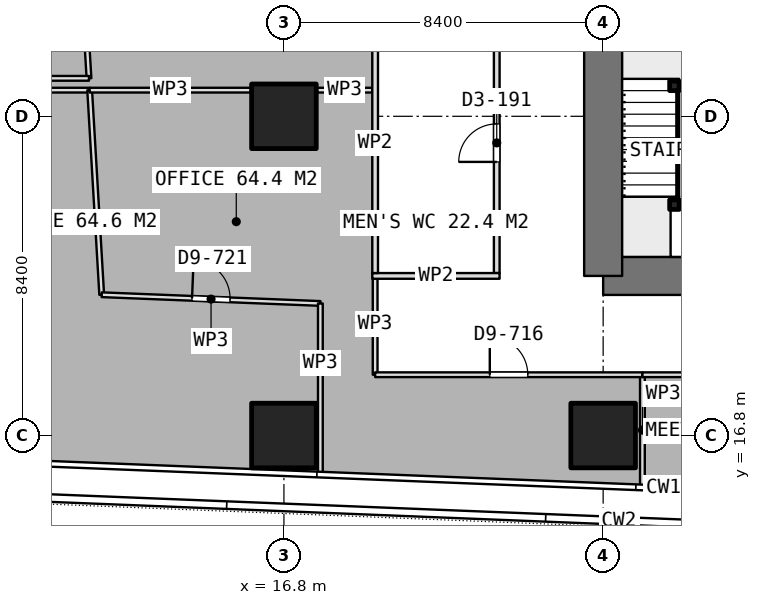
"""IFC4 building model, lengths in metres.
Left out: names, types, materials, properties, quantities, classifications, styles, units other than length and angle.
Written with IfcOpenShell. Run it as: python <this file> out.ifc"""

import sys

from ifc_helpers import new_model, si_unit, direction, frame, frame_2d, origin, origin_2d, place, context, subcontext, project, spatial, rectangle, extrude, element, fill, save


model = new_model("IFC4")
c1 = context("Model", 3, precision=1e-05, world=origin(), true_north=direction((0.0, 1.0)))
c2 = subcontext(c1, "Body", "Model", "MODEL_VIEW")
j1 = project(units=[si_unit("LENGTHUNIT", "METRE"), si_unit("PLANEANGLEUNIT", "RADIAN")], contexts=[c1])
p1 = place(None, origin())
s1 = spatial("IfcSite", under=j1, at=p1, CompositionType="ELEMENT")
p2 = place(p1, origin())
s2 = spatial("IfcBuilding", under=s1, at=p2, CompositionType="ELEMENT")
p3 = place(p2, frame((0.0, 0.0, 183.95)))
s3 = spatial("IfcBuildingStorey", under=s2, at=p3, CompositionType="ELEMENT", Elevation=183.95)
p4 = place(p3, frame((25.2, 21.0, 0.0), z_axis=(0.0, 0.0, 1.0), x_axis=(1.0, 0.0, 0.0)))
e1 = element("IfcWall", 1, at=p4, inside=s3, PredefinedType="SHEAR", context=c2, shape_type="SweptSolid", body=[
    extrude(rectangle(XDim=10.4, YDim=1.0, at=frame_2d((5.2, 0.0))), origin(), (0.0, 0.0, 1.0), 3.75),
])
p5 = place(p3, frame((25.2, 21.0, 0.0), z_axis=(0.0, 0.0, 1.0), x_axis=(0.0, 1.0, 0.0)))
e2 = element("IfcWall", 2, at=p5, inside=s3, PredefinedType="SHEAR", context=c2, shape_type="SweptSolid", body=[
    extrude(rectangle(XDim=25.2, YDim=1.0, at=frame_2d((12.6, 0.0))), origin(), (0.0, 0.0, 1.0), 3.75),
])
p6 = place(p5, frame((7.8, 0.0, 0.0)))
e3 = element("IfcOpeningElement", 3, at=p6, cuts=e2, PredefinedType="OPENING", context=c2, shape_type="SweptSolid", body=[
    extrude(rectangle(XDim=1.2, YDim=2.1, at=frame_2d((0.6, 1.05))), frame((0.0, 0.51, 0.0), z_axis=(0.0, -1.0, 0.0), x_axis=(1.0, 0.0, 0.0)), (0.0, 0.0, 1.0), 1.02),
])
p7 = place(p5, frame((14.25, 0.0, 0.0)))
e4 = element("IfcOpeningElement", 4, at=p7, cuts=e2, PredefinedType="OPENING", context=c2, shape_type="SweptSolid", body=[
    extrude(rectangle(XDim=0.9, YDim=2.1, at=frame_2d((0.45, 1.05))), frame((0.0, 0.51, 0.0), z_axis=(0.0, -1.0, 0.0), x_axis=(1.0, 0.0, 0.0)), (0.0, 0.0, 1.0), 1.02),
])
p8 = place(p5, frame((16.85, 0.0, 0.0)))
e5 = element("IfcOpeningElement", 5, at=p8, cuts=e2, PredefinedType="OPENING", context=c2, shape_type="SweptSolid", body=[
    extrude(rectangle(XDim=0.9, YDim=2.1, at=frame_2d((0.45, 1.05))), frame((0.0, 0.51, 0.0), z_axis=(0.0, -1.0, 0.0), x_axis=(1.0, 0.0, 0.0)), (0.0, 0.0, 1.0), 1.02),
])
p9 = place(p5, frame((19.025, 0.0, 0.0)))
e6 = element("IfcOpeningElement", 6, at=p9, cuts=e2, PredefinedType="OPENING", context=c2, shape_type="SweptSolid", body=[
    extrude(rectangle(XDim=1.2, YDim=2.1, at=frame_2d((0.6, 1.05))), frame((0.0, 0.51, 0.0), z_axis=(0.0, -1.0, 0.0), x_axis=(1.0, 0.0, 0.0)), (0.0, 0.0, 1.0), 1.02),
])
for number, where, z_axis, x_axis in (
    (7, (16.8, 16.8, 0.0), (0.0, 0.0, 1.0), (1.0, 0.0, 0.0)),
    (8, (16.8, 25.2, 0.0), (0.0, 0.0, 1.0), (1.0, 0.0, 0.0)),
    (9, (25.2, 16.8, 0.0), (0.0, 0.0, 1.0), (1.0, 0.0, 0.0)),
):
    element("IfcColumn", number, at=place(p3, frame(where, z_axis=z_axis, x_axis=x_axis)), inside=s3, PredefinedType="COLUMN", context=c2, shape_type="SweptSolid", body=[
        extrude(rectangle(XDim=1.7, YDim=1.7, at=origin_2d()), origin(), (0.0, 0.0, 1.0), 3.75),
    ])
p10 = place(p3, frame((19.125, 21.0, 0.0), z_axis=(0.0, 0.0, 1.0), x_axis=(1.0, 0.0, 0.0)))
e10 = element("IfcWall", 10, at=p10, inside=s3, PredefinedType="PARTITIONING", context=c2, shape_type="SweptSolid", body=[
    extrude(rectangle(XDim=3.35, YDim=0.15, at=frame_2d((1.675, 0.0))), origin(), (0.0, 0.0, 1.0), 3.5),
])
p11 = place(p3, frame((19.2, 21.075, 0.0), z_axis=(0.0, 0.0, 1.0), x_axis=(0.0, 1.0, 0.0)))
e11 = element("IfcWall", 11, at=p11, inside=s3, PredefinedType="PARTITIONING", context=c2, shape_type="SweptSolid", body=[
    extrude(rectangle(XDim=6.85, YDim=0.15, at=frame_2d((3.425, 0.0))), origin(), (0.0, 0.0, 1.0), 3.5),
])
p12 = place(p3, frame((22.4, 21.075, 0.0), z_axis=(0.0, 0.0, 1.0), x_axis=(0.0, 1.0, 0.0)))
e12 = element("IfcWall", 12, at=p12, inside=s3, PredefinedType="PARTITIONING", context=c2, shape_type="SweptSolid", body=[
    extrude(rectangle(XDim=6.85, YDim=0.15, at=frame_2d((3.425, 0.0))), origin(), (0.0, 0.0, 1.0), 3.5),
])
p13 = place(p12, frame((2.925, 0.0, 0.0)))
e13 = element("IfcOpeningElement", 13, at=p13, cuts=e12, PredefinedType="OPENING", context=c2, shape_type="SweptSolid", body=[
    extrude(rectangle(XDim=1.0, YDim=2.1, at=frame_2d((0.5, 1.05))), frame((0.0, 0.085, 0.0), z_axis=(0.0, -1.0, 0.0), x_axis=(1.0, 0.0, 0.0)), (0.0, 0.0, 1.0), 0.17),
])
p14 = place(p3, frame((9.27, 25.888, 0.0), z_axis=(0.0, 0.0, 1.0), x_axis=(1.0, 0.0, 0.0)))
e14 = element("IfcWall", 14, at=p14, inside=s3, PredefinedType="PARTITIONING", context=c2, shape_type="SweptSolid", body=[
    extrude(rectangle(XDim=2.418, YDim=0.125, at=frame_2d((1.209, 0.0))), origin(), (0.0, 0.0, 1.0), 3.5),
])
p15 = place(p3, frame((11.688, 25.888, 0.0), z_axis=(0.0, 0.0, 1.0), x_axis=(0.058767140917, -0.998271718095, 0.0)))
e15 = element("IfcWall", 15, at=p15, inside=s3, PredefinedType="PARTITIONING", context=c2, shape_type="SweptSolid", body=[
    extrude(rectangle(XDim=5.392, YDim=0.125, at=frame_2d((2.696, 0.0))), origin(), (0.0, 0.0, 1.0), 3.5),
])
p16 = place(p3, frame((12.005, 20.505, 0.0), z_axis=(0.0, 0.0, 1.0), x_axis=(0.999202244946, -0.039935869776, 0.0)))
e16 = element("IfcWall", 16, at=p16, inside=s3, PredefinedType="PARTITIONING", context=c2, shape_type="SweptSolid", body=[
    extrude(rectangle(XDim=5.759, YDim=0.125, at=frame_2d((2.879, 0.0))), origin(), (0.0, 0.0, 1.0), 3.5),
])
p17 = place(p16, frame((2.379, 0.0, 0.0)))
e17 = element("IfcOpeningElement", 17, at=p17, cuts=e16, PredefinedType="OPENING", context=c2, shape_type="SweptSolid", body=[
    extrude(rectangle(XDim=1.0, YDim=2.1, at=frame_2d((0.5, 1.05))), frame((0.0, 0.073, 0.0), z_axis=(0.0, -1.0, 0.0), x_axis=(1.0, 0.0, 0.0)), (0.0, 0.0, 1.0), 0.145),
])
p18 = place(p3, frame((17.759, 20.275, 0.0), z_axis=(0.0, 0.0, 1.0), x_axis=(0.0, -1.0, 0.0)))
e18 = element("IfcWall", 18, at=p18, inside=s3, PredefinedType="PARTITIONING", context=c2, shape_type="SweptSolid", body=[
    extrude(rectangle(XDim=4.453, YDim=0.125, at=frame_2d((2.227, 0.0))), origin(), (0.0, 0.0, 1.0), 3.5),
])
p19 = place(p3, frame((26.233, 18.4, 0.0), z_axis=(0.0, 0.0, 1.0), x_axis=(0.0, -1.0, 0.0)))
e19 = element("IfcWall", 19, at=p19, inside=s3, PredefinedType="PARTITIONING", context=c2, shape_type="SweptSolid", body=[
    extrude(rectangle(XDim=2.917, YDim=0.125, at=frame_2d((1.458, 0.0))), origin(), (0.0, 0.0, 1.0), 3.5),
])
p20 = place(p3, frame((11.688, 25.888, 0.0), z_axis=(0.0, 0.0, 1.0), x_axis=(1.0, 0.0, 0.0)))
e20 = element("IfcWall", 20, at=p20, inside=s3, PredefinedType="PARTITIONING", context=c2, shape_type="SweptSolid", body=[
    extrude(rectangle(XDim=4.242, YDim=0.125, at=frame_2d((2.121, 0.0))), origin(), (0.0, 0.0, 1.0), 3.5),
])
p21 = place(p3, frame((17.67, 25.888, 0.0), z_axis=(0.0, 0.0, 1.0), x_axis=(1.0, 0.0, 0.0)))
e21 = element("IfcWall", 21, at=p21, inside=s3, PredefinedType="PARTITIONING", context=c2, shape_type="SweptSolid", body=[
    extrude(rectangle(XDim=1.455, YDim=0.125, at=frame_2d((0.728, 0.0))), origin(), (0.0, 0.0, 1.0), 3.5),
])
p22 = place(p3, frame((19.2, 21.075, 0.0), z_axis=(0.0, 0.0, 1.0), x_axis=(0.0, -1.0, 0.0)))
e22 = element("IfcWall", 22, at=p22, inside=s3, PredefinedType="PARTITIONING", context=c2, shape_type="SweptSolid", body=[
    extrude(rectangle(XDim=2.675, YDim=0.125, at=frame_2d((1.337, 0.0))), origin(), (0.0, 0.0, 1.0), 3.5),
])
p23 = place(p3, frame((19.2, 18.4, 0.0), z_axis=(0.0, 0.0, 1.0), x_axis=(1.0, 0.0, 0.0)))
e23 = element("IfcWall", 23, at=p23, inside=s3, PredefinedType="PARTITIONING", context=c2, shape_type="SweptSolid", body=[
    extrude(rectangle(XDim=7.033, YDim=0.125, at=frame_2d((3.517, 0.0))), origin(), (0.0, 0.0, 1.0), 3.5),
])
p24 = place(p23, frame((3.017, 0.0, 0.0)))
e24 = element("IfcOpeningElement", 24, at=p24, cuts=e23, PredefinedType="OPENING", context=c2, shape_type="SweptSolid", body=[
    extrude(rectangle(XDim=1.0, YDim=2.1, at=frame_2d((0.5, 1.05))), frame((0.0, 0.073, 0.0), z_axis=(0.0, -1.0, 0.0), x_axis=(1.0, 0.0, 0.0)), (0.0, 0.0, 1.0), 0.145),
])
p25 = place(p3, frame((26.233, 18.4, 0.0), z_axis=(0.0, 0.0, 1.0), x_axis=(1.0, 0.0, 0.0)))
e25 = element("IfcWall", 25, at=p25, inside=s3, PredefinedType="PARTITIONING", context=c2, shape_type="SweptSolid", body=[
    extrude(rectangle(XDim=8.472, YDim=0.125, at=frame_2d((4.236, 0.0))), origin(), (0.0, 0.0, 1.0), 3.5),
])
p26 = place(p25, frame((3.736, 0.0, 0.0)))
e26 = element("IfcOpeningElement", 26, at=p26, cuts=e25, PredefinedType="OPENING", context=c2, shape_type="SweptSolid", body=[
    extrude(rectangle(XDim=1.0, YDim=2.1, at=frame_2d((0.5, 1.05))), frame((0.0, 0.073, 0.0), z_axis=(0.0, -1.0, 0.0), x_axis=(1.0, 0.0, 0.0)), (0.0, 0.0, 1.0), 0.145),
])
p27 = place(p3, frame((11.168, 34.71, 0.0), z_axis=(0.0, 0.0, 1.0), x_axis=(0.058874777336, -0.998265375836, 0.0)))
e27 = element("IfcWall", 27, at=p27, inside=s3, PredefinedType="PARTITIONING", context=c2, shape_type="SweptSolid", body=[
    extrude(rectangle(XDim=8.526, YDim=0.125, at=frame_2d((4.263, 0.0))), origin(), (0.0, 0.0, 1.0), 3.5),
])
p28 = place(p27, frame((3.763, 0.0, 0.0)))
e28 = element("IfcOpeningElement", 28, at=p28, cuts=e27, PredefinedType="OPENING", context=c2, shape_type="SweptSolid", body=[
    extrude(rectangle(XDim=1.0, YDim=2.1, at=frame_2d((0.5, 1.05))), frame((0.0, 0.073, 0.0), z_axis=(0.0, -1.0, 0.0), x_axis=(1.0, 0.0, 0.0)), (0.0, 0.0, 1.0), 0.145),
])
p29 = place(p3, frame((11.67, 26.199, 0.0), z_axis=(0.0, 0.0, 1.0), x_axis=(-1.0, 0.0, 0.0)))
e29 = element("IfcWall", 29, at=p29, inside=s3, PredefinedType="PARTITIONING", context=c2, shape_type="SweptSolid", body=[
    extrude(rectangle(XDim=4.458, YDim=0.125, at=frame_2d((2.229, 0.0))), origin(), (0.0, 0.0, 1.0), 3.5),
])
for number, where, z_axis, x_axis in (
    (30, (27.075, 22.875, 0.0), (0.0, 0.0, 1.0), (1.0, 0.0, 0.0)),
    (31, (27.075, 26.0, 0.0), (0.0, 0.0, 1.0), (1.0, 0.0, 0.0)),
):
    element("IfcColumn", number, at=place(p3, frame(where, z_axis=z_axis, x_axis=x_axis)), inside=s3, PredefinedType="COLUMN", context=c2, shape_type="SweptSolid", body=[
        extrude(rectangle(XDim=0.25, YDim=0.25, at=origin_2d()), origin(), (0.0, 0.0, 1.0), 3.75),
    ])
p30 = place(p13, origin())
e32 = element("IfcDoor", 32, at=p30, inside=s3, OperationType="SINGLE_SWING_LEFT", PredefinedType="DOOR", context=c2, shape_type="SweptSolid", body=[
    extrude(rectangle(XDim=1.0, YDim=2.1, at=frame_2d((0.5, 1.05))), frame((0.0, 0.025, 0.0), z_axis=(0.0, -1.0, 0.0), x_axis=(1.0, 0.0, 0.0)), (0.0, 0.0, 1.0), 0.05),
])
fill(e13, e32)
p31 = place(p24, origin())
e33 = element("IfcDoor", 33, at=p31, inside=s3, OperationType="SINGLE_SWING_LEFT", PredefinedType="DOOR", context=c2, shape_type="SweptSolid", body=[
    extrude(rectangle(XDim=1.0, YDim=2.1, at=frame_2d((0.5, 1.05))), frame((0.0, 0.025, 0.0), z_axis=(0.0, -1.0, 0.0), x_axis=(1.0, 0.0, 0.0)), (0.0, 0.0, 1.0), 0.05),
])
fill(e24, e33)
p32 = place(p17, origin())
e34 = element("IfcDoor", 34, at=p32, inside=s3, OperationType="SINGLE_SWING_LEFT", PredefinedType="DOOR", context=c2, shape_type="SweptSolid", body=[
    extrude(rectangle(XDim=1.0, YDim=2.1, at=frame_2d((0.5, 1.05))), frame((0.0, 0.025, 0.0), z_axis=(0.0, -1.0, 0.0), x_axis=(1.0, 0.0, 0.0)), (0.0, 0.0, 1.0), 0.05),
])
fill(e17, e34)
save(model, sys.argv[1])
